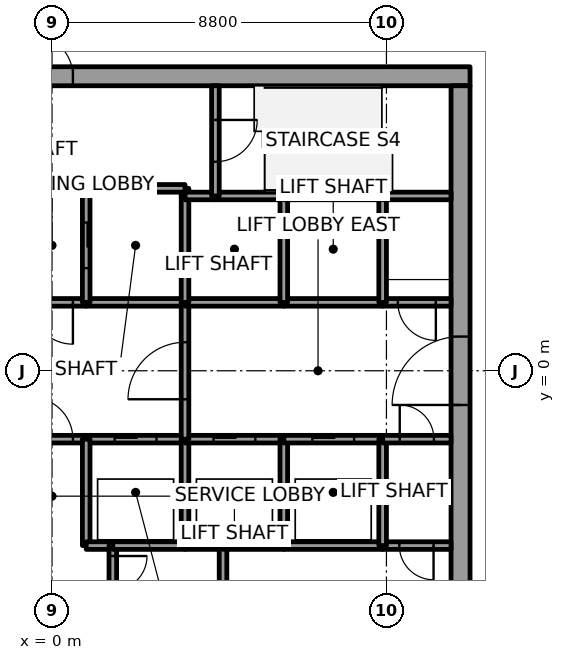
"""IFC4 building model, lengths in metres.
Left out: names, types, materials, properties, quantities, classifications, styles, units other than length and angle.
Written with IfcOpenShell. Run it as: python <this file> out.ifc"""

import sys

from ifc_helpers import new_model, si_unit, direction, frame, frame_2d, origin, place, context, subcontext, project, spatial, rectangle, extrude, element, fill, save


model = new_model("IFC4")
c1 = context("Model", 3, precision=1e-05, world=origin(), true_north=direction((0.0, 1.0)))
c2 = subcontext(c1, "Body", "Model", "MODEL_VIEW")
j1 = project(units=[si_unit("LENGTHUNIT", "METRE"), si_unit("PLANEANGLEUNIT", "RADIAN")], contexts=[c1])
p1 = place(None, origin())
s1 = spatial("IfcSite", under=j1, at=p1, CompositionType="ELEMENT")
p2 = place(p1, origin())
s2 = spatial("IfcBuilding", under=s1, at=p2, CompositionType="ELEMENT")
p3 = place(p2, frame((0.0, 0.0, 173.8)))
s3 = spatial("IfcBuildingStorey", under=s2, at=p3, CompositionType="ELEMENT", Elevation=173.8)
p4 = place(p3, frame((-11.0, 7.75, 0.0), z_axis=(0.0, 0.0, 1.0), x_axis=(1.0, 0.0, 0.0)))
e1 = element("IfcWall", 1, at=p4, inside=s3, PredefinedType="SHEAR", context=c2, shape_type="SweptSolid", body=[
    extrude(rectangle(XDim=22.0, YDim=0.5, at=frame_2d((11.0, 0.0))), origin(), (0.0, 0.0, 1.0), 4.0),
])
p5 = place(p4, frame((10.45, 0.0, 0.0)))
e2 = element("IfcOpeningElement", 2, at=p5, cuts=e1, PredefinedType="OPENING", context=c2, shape_type="SweptSolid", body=[
    extrude(rectangle(XDim=1.1, YDim=2.1, at=frame_2d((0.55, 1.05))), frame((0.0, 0.25, 0.0), z_axis=(0.0, -1.0, 0.0), x_axis=(1.0, 0.0, 0.0)), (0.0, 0.0, 1.0), 0.5),
])
p6 = place(p3, frame((10.75, -7.5, 0.0), z_axis=(0.0, 0.0, 1.0), x_axis=(0.0, 1.0, 0.0)))
e3 = element("IfcWall", 3, at=p6, inside=s3, PredefinedType="SHEAR", context=c2, shape_type="SweptSolid", body=[
    extrude(rectangle(XDim=15.0, YDim=0.5, at=frame_2d((7.5, 0.0))), origin(), (0.0, 0.0, 1.0), 4.0),
])
p7 = place(p6, frame((6.6, 0.0, 0.0)))
e4 = element("IfcOpeningElement", 4, at=p7, cuts=e3, PredefinedType="OPENING", context=c2, shape_type="SweptSolid", body=[
    extrude(rectangle(XDim=1.8, YDim=2.1, at=frame_2d((0.9, 1.05))), frame((0.0, 0.25, 0.0), z_axis=(0.0, -1.0, 0.0), x_axis=(1.0, 0.0, 0.0)), (0.0, 0.0, 1.0), 0.5),
])
p8 = place(p3, frame((-0.9, -1.8, 0.0), z_axis=(0.0, 0.0, 1.0), x_axis=(1.0, 0.0, 0.0)))
e5 = element("IfcWall", 5, at=p8, inside=s3, PredefinedType="SOLIDWALL", context=c2, shape_type="SweptSolid", body=[
    extrude(rectangle(XDim=1.8, YDim=0.2, at=frame_2d((0.9, 0.0))), origin(), (0.0, 0.0, 1.0), 3.85),
])
p9 = place(p8, frame((0.35, 0.0, 0.0)))
e6 = element("IfcOpeningElement", 6, at=p9, cuts=e5, PredefinedType="OPENING", context=c2, shape_type="SweptSolid", body=[
    extrude(rectangle(XDim=1.1, YDim=2.1, at=frame_2d((0.55, 1.05))), frame((0.0, 0.1, 0.0), z_axis=(0.0, -1.0, 0.0), x_axis=(1.0, 0.0, 0.0)), (0.0, 0.0, 1.0), 0.2),
])
p10 = place(p3, frame((0.9, 1.8, 0.0), z_axis=(0.0, 0.0, 1.0), x_axis=(-1.0, 0.0, 0.0)))
e7 = element("IfcWall", 7, at=p10, inside=s3, PredefinedType="SOLIDWALL", context=c2, shape_type="SweptSolid", body=[
    extrude(rectangle(XDim=1.8, YDim=0.2, at=frame_2d((0.9, 0.0))), origin(), (0.0, 0.0, 1.0), 3.85),
])
p11 = place(p10, frame((0.35, 0.0, 0.0)))
e8 = element("IfcOpeningElement", 8, at=p11, cuts=e7, PredefinedType="OPENING", context=c2, shape_type="SweptSolid", body=[
    extrude(rectangle(XDim=1.1, YDim=2.1, at=frame_2d((0.55, 1.05))), frame((0.0, 0.1, 0.0), z_axis=(0.0, -1.0, 0.0), x_axis=(1.0, 0.0, 0.0)), (0.0, 0.0, 1.0), 0.2),
])
p12 = place(p3, frame((0.9, -1.8, 0.0), z_axis=(0.0, 0.0, 1.0), x_axis=(1.0, 0.0, 0.0)))
e9 = element("IfcWall", 9, at=p12, inside=s3, PredefinedType="SOLIDWALL", context=c2, shape_type="SweptSolid", body=[
    extrude(rectangle(XDim=2.6, YDim=0.2, at=frame_2d((1.3, 0.0))), origin(), (0.0, 0.0, 1.0), 3.85),
])
p13 = place(p12, frame((0.75, 0.0, 0.0)))
e10 = element("IfcOpeningElement", 10, at=p13, cuts=e9, PredefinedType="OPENING", context=c2, shape_type="SweptSolid", body=[
    extrude(rectangle(XDim=1.1, YDim=2.1, at=frame_2d((0.55, 1.05))), frame((0.0, 0.1, 0.0), z_axis=(0.0, -1.0, 0.0), x_axis=(1.0, 0.0, 0.0)), (0.0, 0.0, 1.0), 0.2),
])
p14 = place(p3, frame((0.9, -1.8, 0.0), z_axis=(0.0, 0.0, 1.0), x_axis=(0.0, -1.0, 0.0)))
e11 = element("IfcWall", 11, at=p14, inside=s3, PredefinedType="SOLIDWALL", context=c2, shape_type="SweptSolid", body=[
    extrude(rectangle(XDim=2.8, YDim=0.2, at=frame_2d((1.4, 0.0))), origin(), (0.0, 0.0, 1.0), 3.85),
])
p15 = place(p3, frame((0.9, -4.6, 0.0), z_axis=(0.0, 0.0, 1.0), x_axis=(1.0, 0.0, 0.0)))
e12 = element("IfcWall", 12, at=p15, inside=s3, PredefinedType="SOLIDWALL", context=c2, shape_type="SweptSolid", body=[
    extrude(rectangle(XDim=0.7, YDim=0.2, at=frame_2d((0.35, 0.0))), origin(), (0.0, 0.0, 1.0), 3.85),
])
p16 = place(p3, frame((3.5, 1.8, 0.0), z_axis=(0.0, 0.0, 1.0), x_axis=(-1.0, 0.0, 0.0)))
e13 = element("IfcWall", 13, at=p16, inside=s3, PredefinedType="SOLIDWALL", context=c2, shape_type="SweptSolid", body=[
    extrude(rectangle(XDim=2.6, YDim=0.2, at=frame_2d((1.3, 0.0))), origin(), (0.0, 0.0, 1.0), 3.85),
])
p17 = place(p3, frame((3.5, 4.6, 0.0), z_axis=(0.0, 0.0, 1.0), x_axis=(0.0, 1.0, 0.0)))
e14 = element("IfcWall", 14, at=p17, inside=s3, PredefinedType="SOLIDWALL", context=c2, shape_type="SweptSolid", body=[
    extrude(rectangle(XDim=0.2, YDim=0.2, at=frame_2d((0.1, 0.0))), origin(), (0.0, 0.0, 1.0), 3.85),
])
p18 = place(p3, frame((3.5, 4.8, 0.0), z_axis=(0.0, 0.0, 1.0), x_axis=(-1.0, 0.0, 0.0)))
e15 = element("IfcWall", 15, at=p18, inside=s3, PredefinedType="SOLIDWALL", context=c2, shape_type="SweptSolid", body=[
    extrude(rectangle(XDim=2.6, YDim=0.2, at=frame_2d((1.3, 0.0))), origin(), (0.0, 0.0, 1.0), 3.85),
])
p19 = place(p3, frame((0.9, 4.8, 0.0), z_axis=(0.0, 0.0, 1.0), x_axis=(0.0, -1.0, 0.0)))
e16 = element("IfcWall", 16, at=p19, inside=s3, PredefinedType="SOLIDWALL", context=c2, shape_type="SweptSolid", body=[
    extrude(rectangle(XDim=3.0, YDim=0.2, at=frame_2d((1.5, 0.0))), origin(), (0.0, 0.0, 1.0), 3.85),
])
p20 = place(p19, frame((0.9, 0.0, 0.0)))
e17 = element("IfcOpeningElement", 17, at=p20, cuts=e16, PredefinedType="OPENING", context=c2, shape_type="SweptSolid", body=[
    extrude(rectangle(XDim=1.2, YDim=2.1, at=frame_2d((0.6, 1.05))), frame((0.0, 0.1, 0.0), z_axis=(0.0, -1.0, 0.0), x_axis=(1.0, 0.0, 0.0)), (0.0, 0.0, 1.0), 0.2),
])
p21 = place(p3, frame((1.6, -4.6, 0.0), z_axis=(0.0, 0.0, 1.0), x_axis=(0.0, -1.0, 0.0)))
e18 = element("IfcWall", 18, at=p21, inside=s3, PredefinedType="SOLIDWALL", context=c2, shape_type="SweptSolid", body=[
    extrude(rectangle(XDim=1.45, YDim=0.2, at=frame_2d((0.725, 0.0))), origin(), (0.0, 0.0, 1.0), 3.85),
])
p22 = place(p21, frame((0.275, 0.0, 0.0)))
e19 = element("IfcOpeningElement", 19, at=p22, cuts=e18, PredefinedType="OPENING", context=c2, shape_type="SweptSolid", body=[
    extrude(rectangle(XDim=0.9, YDim=2.1, at=frame_2d((0.45, 1.05))), frame((0.0, 0.1, 0.0), z_axis=(0.0, -1.0, 0.0), x_axis=(1.0, 0.0, 0.0)), (0.0, 0.0, 1.0), 0.2),
])
p23 = place(p3, frame((3.5, -4.6, 0.0), z_axis=(0.0, 0.0, 1.0), x_axis=(-1.0, 0.0, 0.0)))
e20 = element("IfcWall", 20, at=p23, inside=s3, PredefinedType="SOLIDWALL", context=c2, shape_type="SweptSolid", body=[
    extrude(rectangle(XDim=1.9, YDim=0.2, at=frame_2d((0.95, 0.0))), origin(), (0.0, 0.0, 1.0), 3.85),
])
p24 = place(p3, frame((4.5, -4.6, 0.0), z_axis=(0.0, 0.0, 1.0), x_axis=(-1.0, 0.0, 0.0)))
e21 = element("IfcWall", 21, at=p24, inside=s3, PredefinedType="SOLIDWALL", context=c2, shape_type="SweptSolid", body=[
    extrude(rectangle(XDim=1.0, YDim=0.2, at=frame_2d((0.5, 0.0))), origin(), (0.0, 0.0, 1.0), 3.85),
])
p25 = place(p3, frame((3.5, -4.6, 0.0), z_axis=(0.0, 0.0, 1.0), x_axis=(0.0, 1.0, 0.0)))
e22 = element("IfcWall", 22, at=p25, inside=s3, PredefinedType="SOLIDWALL", context=c2, shape_type="SweptSolid", body=[
    extrude(rectangle(XDim=2.8, YDim=0.2, at=frame_2d((1.4, 0.0))), origin(), (0.0, 0.0, 1.0), 3.85),
])
p26 = place(p3, frame((3.5, -1.8, 0.0), z_axis=(0.0, 0.0, 1.0), x_axis=(1.0, 0.0, 0.0)))
e23 = element("IfcWall", 23, at=p26, inside=s3, PredefinedType="SOLIDWALL", context=c2, shape_type="SweptSolid", body=[
    extrude(rectangle(XDim=2.6, YDim=0.2, at=frame_2d((1.3, 0.0))), origin(), (0.0, 0.0, 1.0), 3.85),
])
p27 = place(p26, frame((0.75, 0.0, 0.0)))
e24 = element("IfcOpeningElement", 24, at=p27, cuts=e23, PredefinedType="OPENING", context=c2, shape_type="SweptSolid", body=[
    extrude(rectangle(XDim=1.1, YDim=2.1, at=frame_2d((0.55, 1.05))), frame((0.0, 0.1, 0.0), z_axis=(0.0, -1.0, 0.0), x_axis=(1.0, 0.0, 0.0)), (0.0, 0.0, 1.0), 0.2),
])
p28 = place(p3, frame((3.5, -1.8, 0.0), z_axis=(0.0, 0.0, 1.0), x_axis=(0.0, 1.0, 0.0)))
e25 = element("IfcWall", 25, at=p28, inside=s3, PredefinedType="SOLIDWALL", context=c2, shape_type="SweptSolid", body=[
    extrude(rectangle(XDim=3.6, YDim=0.2, at=frame_2d((1.8, 0.0))), origin(), (0.0, 0.0, 1.0), 3.85),
])
p29 = place(p28, frame((1.05, 0.0, 0.0)))
e26 = element("IfcOpeningElement", 26, at=p29, cuts=e25, PredefinedType="OPENING", context=c2, shape_type="SweptSolid", body=[
    extrude(rectangle(XDim=1.5, YDim=2.1, at=frame_2d((0.75, 1.05))), frame((0.0, 0.1, 0.0), z_axis=(0.0, -1.0, 0.0), x_axis=(1.0, 0.0, 0.0)), (0.0, 0.0, 1.0), 0.2),
])
p30 = place(p3, frame((6.1, 1.8, 0.0), z_axis=(0.0, 0.0, 1.0), x_axis=(-1.0, 0.0, 0.0)))
e27 = element("IfcWall", 27, at=p30, inside=s3, PredefinedType="SOLIDWALL", context=c2, shape_type="SweptSolid", body=[
    extrude(rectangle(XDim=2.6, YDim=0.2, at=frame_2d((1.3, 0.0))), origin(), (0.0, 0.0, 1.0), 3.85),
])
p31 = place(p3, frame((3.5, 1.8, 0.0), z_axis=(0.0, 0.0, 1.0), x_axis=(0.0, 1.0, 0.0)))
e28 = element("IfcWall", 28, at=p31, inside=s3, PredefinedType="SOLIDWALL", context=c2, shape_type="SweptSolid", body=[
    extrude(rectangle(XDim=2.8, YDim=0.2, at=frame_2d((1.4, 0.0))), origin(), (0.0, 0.0, 1.0), 3.85),
])
p32 = place(p3, frame((4.3, 4.6, 0.0), z_axis=(0.0, 0.0, 1.0), x_axis=(-1.0, 0.0, 0.0)))
e29 = element("IfcWall", 29, at=p32, inside=s3, PredefinedType="SOLIDWALL", context=c2, shape_type="SweptSolid", body=[
    extrude(rectangle(XDim=0.8, YDim=0.2, at=frame_2d((0.4, 0.0))), origin(), (0.0, 0.0, 1.0), 3.85),
])
p33 = place(p3, frame((6.1, 4.6, 0.0), z_axis=(0.0, 0.0, 1.0), x_axis=(-1.0, 0.0, 0.0)))
e30 = element("IfcWall", 30, at=p33, inside=s3, PredefinedType="SOLIDWALL", context=c2, shape_type="SweptSolid", body=[
    extrude(rectangle(XDim=1.8, YDim=0.2, at=frame_2d((0.9, 0.0))), origin(), (0.0, 0.0, 1.0), 3.85),
])
p34 = place(p3, frame((4.3, 7.5, 0.0), z_axis=(0.0, 0.0, 1.0), x_axis=(0.0, -1.0, 0.0)))
e31 = element("IfcWall", 31, at=p34, inside=s3, PredefinedType="SOLIDWALL", context=c2, shape_type="SweptSolid", body=[
    extrude(rectangle(XDim=2.9, YDim=0.2, at=frame_2d((1.45, 0.0))), origin(), (0.0, 0.0, 1.0), 3.85),
])
p35 = place(p34, frame((0.9, 0.0, 0.0)))
e32 = element("IfcOpeningElement", 32, at=p35, cuts=e31, PredefinedType="OPENING", context=c2, shape_type="SweptSolid", body=[
    extrude(rectangle(XDim=1.1, YDim=2.1, at=frame_2d((0.55, 1.05))), frame((0.0, 0.1, 0.0), z_axis=(0.0, -1.0, 0.0), x_axis=(1.0, 0.0, 0.0)), (0.0, 0.0, 1.0), 0.2),
])
p36 = place(p3, frame((4.5, -4.6, 0.0), z_axis=(0.0, 0.0, 1.0), x_axis=(0.0, -1.0, 0.0)))
e33 = element("IfcWall", 33, at=p36, inside=s3, PredefinedType="SOLIDWALL", context=c2, shape_type="SweptSolid", body=[
    extrude(rectangle(XDim=1.45, YDim=0.2, at=frame_2d((0.725, 0.0))), origin(), (0.0, 0.0, 1.0), 3.85),
])
p37 = place(p3, frame((6.1, -4.6, 0.0), z_axis=(0.0, 0.0, 1.0), x_axis=(-1.0, 0.0, 0.0)))
e34 = element("IfcWall", 34, at=p37, inside=s3, PredefinedType="SOLIDWALL", context=c2, shape_type="SweptSolid", body=[
    extrude(rectangle(XDim=1.6, YDim=0.2, at=frame_2d((0.8, 0.0))), origin(), (0.0, 0.0, 1.0), 3.85),
])
p38 = place(p3, frame((8.7, -4.6, 0.0), z_axis=(0.0, 0.0, 1.0), x_axis=(-1.0, 0.0, 0.0)))
e35 = element("IfcWall", 35, at=p38, inside=s3, PredefinedType="SOLIDWALL", context=c2, shape_type="SweptSolid", body=[
    extrude(rectangle(XDim=2.6, YDim=0.2, at=frame_2d((1.3, 0.0))), origin(), (0.0, 0.0, 1.0), 3.85),
])
p39 = place(p3, frame((6.1, -4.6, 0.0), z_axis=(0.0, 0.0, 1.0), x_axis=(0.0, 1.0, 0.0)))
e36 = element("IfcWall", 36, at=p39, inside=s3, PredefinedType="SOLIDWALL", context=c2, shape_type="SweptSolid", body=[
    extrude(rectangle(XDim=2.8, YDim=0.2, at=frame_2d((1.4, 0.0))), origin(), (0.0, 0.0, 1.0), 3.85),
])
p40 = place(p3, frame((6.1, -1.8, 0.0), z_axis=(0.0, 0.0, 1.0), x_axis=(1.0, 0.0, 0.0)))
e37 = element("IfcWall", 37, at=p40, inside=s3, PredefinedType="SOLIDWALL", context=c2, shape_type="SweptSolid", body=[
    extrude(rectangle(XDim=2.6, YDim=0.2, at=frame_2d((1.3, 0.0))), origin(), (0.0, 0.0, 1.0), 3.85),
])
p41 = place(p40, frame((0.75, 0.0, 0.0)))
e38 = element("IfcOpeningElement", 38, at=p41, cuts=e37, PredefinedType="OPENING", context=c2, shape_type="SweptSolid", body=[
    extrude(rectangle(XDim=1.1, YDim=2.1, at=frame_2d((0.55, 1.05))), frame((0.0, 0.1, 0.0), z_axis=(0.0, -1.0, 0.0), x_axis=(1.0, 0.0, 0.0)), (0.0, 0.0, 1.0), 0.2),
])
p42 = place(p3, frame((8.7, 1.8, 0.0), z_axis=(0.0, 0.0, 1.0), x_axis=(-1.0, 0.0, 0.0)))
e39 = element("IfcWall", 39, at=p42, inside=s3, PredefinedType="SOLIDWALL", context=c2, shape_type="SweptSolid", body=[
    extrude(rectangle(XDim=2.6, YDim=0.2, at=frame_2d((1.3, 0.0))), origin(), (0.0, 0.0, 1.0), 3.85),
])
p43 = place(p3, frame((6.1, 1.8, 0.0), z_axis=(0.0, 0.0, 1.0), x_axis=(0.0, 1.0, 0.0)))
e40 = element("IfcWall", 40, at=p43, inside=s3, PredefinedType="SOLIDWALL", context=c2, shape_type="SweptSolid", body=[
    extrude(rectangle(XDim=2.8, YDim=0.2, at=frame_2d((1.4, 0.0))), origin(), (0.0, 0.0, 1.0), 3.85),
])
p44 = place(p3, frame((8.7, 4.6, 0.0), z_axis=(0.0, 0.0, 1.0), x_axis=(-1.0, 0.0, 0.0)))
e41 = element("IfcWall", 41, at=p44, inside=s3, PredefinedType="SOLIDWALL", context=c2, shape_type="SweptSolid", body=[
    extrude(rectangle(XDim=2.6, YDim=0.2, at=frame_2d((1.3, 0.0))), origin(), (0.0, 0.0, 1.0), 3.85),
])
p45 = place(p3, frame((10.5, -4.6, 0.0), z_axis=(0.0, 0.0, 1.0), x_axis=(-1.0, 0.0, 0.0)))
e42 = element("IfcWall", 42, at=p45, inside=s3, PredefinedType="SOLIDWALL", context=c2, shape_type="SweptSolid", body=[
    extrude(rectangle(XDim=1.8, YDim=0.2, at=frame_2d((0.9, 0.0))), origin(), (0.0, 0.0, 1.0), 3.85),
])
p46 = place(p45, frame((0.46, 0.0, 0.0)))
e43 = element("IfcOpeningElement", 43, at=p46, cuts=e42, PredefinedType="OPENING", context=c2, shape_type="SweptSolid", body=[
    extrude(rectangle(XDim=0.9, YDim=2.1, at=frame_2d((0.45, 1.05))), frame((0.0, 0.1, 0.0), z_axis=(0.0, -1.0, 0.0), x_axis=(1.0, 0.0, 0.0)), (0.0, 0.0, 1.0), 0.2),
])
p47 = place(p3, frame((8.7, -1.8, 0.0), z_axis=(0.0, 0.0, 1.0), x_axis=(0.0, -1.0, 0.0)))
e44 = element("IfcWall", 44, at=p47, inside=s3, PredefinedType="SOLIDWALL", context=c2, shape_type="SweptSolid", body=[
    extrude(rectangle(XDim=2.8, YDim=0.2, at=frame_2d((1.4, 0.0))), origin(), (0.0, 0.0, 1.0), 3.85),
])
p48 = place(p3, frame((8.7, -1.8, 0.0), z_axis=(0.0, 0.0, 1.0), x_axis=(1.0, 0.0, 0.0)))
e45 = element("IfcWall", 45, at=p48, inside=s3, PredefinedType="SOLIDWALL", context=c2, shape_type="SweptSolid", body=[
    extrude(rectangle(XDim=1.8, YDim=0.2, at=frame_2d((0.9, 0.0))), origin(), (0.0, 0.0, 1.0), 3.85),
])
p49 = place(p48, frame((0.45, 0.0, 0.0)))
e46 = element("IfcOpeningElement", 46, at=p49, cuts=e45, PredefinedType="OPENING", context=c2, shape_type="SweptSolid", body=[
    extrude(rectangle(XDim=0.9, YDim=2.1, at=frame_2d((0.45, 1.05))), frame((0.0, 0.1, 0.0), z_axis=(0.0, -1.0, 0.0), x_axis=(1.0, 0.0, 0.0)), (0.0, 0.0, 1.0), 0.2),
])
p50 = place(p3, frame((10.5, 1.8, 0.0), z_axis=(0.0, 0.0, 1.0), x_axis=(-1.0, 0.0, 0.0)))
e47 = element("IfcWall", 47, at=p50, inside=s3, PredefinedType="SOLIDWALL", context=c2, shape_type="SweptSolid", body=[
    extrude(rectangle(XDim=1.8, YDim=0.2, at=frame_2d((0.9, 0.0))), origin(), (0.0, 0.0, 1.0), 3.85),
])
p51 = place(p50, frame((0.4, 0.0, 0.0)))
e48 = element("IfcOpeningElement", 48, at=p51, cuts=e47, PredefinedType="OPENING", context=c2, shape_type="SweptSolid", body=[
    extrude(rectangle(XDim=1.0, YDim=2.1, at=frame_2d((0.5, 1.05))), frame((0.0, 0.1, 0.0), z_axis=(0.0, -1.0, 0.0), x_axis=(1.0, 0.0, 0.0)), (0.0, 0.0, 1.0), 0.2),
])
p52 = place(p3, frame((8.7, 4.6, 0.0), z_axis=(0.0, 0.0, 1.0), x_axis=(0.0, -1.0, 0.0)))
e49 = element("IfcWall", 49, at=p52, inside=s3, PredefinedType="SOLIDWALL", context=c2, shape_type="SweptSolid", body=[
    extrude(rectangle(XDim=2.8, YDim=0.2, at=frame_2d((1.4, 0.0))), origin(), (0.0, 0.0, 1.0), 3.85),
])
p53 = place(p3, frame((10.5, 4.6, 0.0), z_axis=(0.0, 0.0, 1.0), x_axis=(-1.0, 0.0, 0.0)))
e50 = element("IfcWall", 50, at=p53, inside=s3, PredefinedType="SOLIDWALL", context=c2, shape_type="SweptSolid", body=[
    extrude(rectangle(XDim=1.8, YDim=0.2, at=frame_2d((0.9, 0.0))), origin(), (0.0, 0.0, 1.0), 3.85),
])
p54 = place(p13, origin())
e51 = element("IfcDoor", 51, at=p54, inside=s3, OperationType="SLIDING_TO_LEFT", PredefinedType="DOOR", context=c2, shape_type="SweptSolid", body=[
    extrude(rectangle(XDim=1.1, YDim=2.1, at=frame_2d((0.55, 1.05))), frame((0.0, 0.025, 0.0), z_axis=(0.0, -1.0, 0.0), x_axis=(1.0, 0.0, 0.0)), (0.0, 0.0, 1.0), 0.05),
])
fill(e10, e51)
p55 = place(p27, origin())
e52 = element("IfcDoor", 52, at=p55, inside=s3, OperationType="SLIDING_TO_LEFT", PredefinedType="DOOR", context=c2, shape_type="SweptSolid", body=[
    extrude(rectangle(XDim=1.1, YDim=2.1, at=frame_2d((0.55, 1.05))), frame((0.0, 0.025, 0.0), z_axis=(0.0, -1.0, 0.0), x_axis=(1.0, 0.0, 0.0)), (0.0, 0.0, 1.0), 0.05),
])
fill(e24, e52)
p56 = place(p41, origin())
e53 = element("IfcDoor", 53, at=p56, inside=s3, OperationType="SLIDING_TO_LEFT", PredefinedType="DOOR", context=c2, shape_type="SweptSolid", body=[
    extrude(rectangle(XDim=1.1, YDim=2.1, at=frame_2d((0.55, 1.05))), frame((0.0, 0.025, 0.0), z_axis=(0.0, -1.0, 0.0), x_axis=(1.0, 0.0, 0.0)), (0.0, 0.0, 1.0), 0.05),
])
fill(e38, e53)
p57 = place(p20, origin())
e54 = element("IfcDoor", 54, at=p57, inside=s3, OperationType="SLIDING_TO_LEFT", PredefinedType="DOOR", context=c2, shape_type="SweptSolid", body=[
    extrude(rectangle(XDim=1.2, YDim=2.1, at=frame_2d((0.6, 1.05))), frame((0.0, 0.025, 0.0), z_axis=(0.0, -1.0, 0.0), x_axis=(1.0, 0.0, 0.0)), (0.0, 0.0, 1.0), 0.05),
])
fill(e17, e54)
p58 = place(p29, origin())
e55 = element("IfcDoor", 55, at=p58, inside=s3, OperationType="DOUBLE_DOOR_SINGLE_SWING", PredefinedType="DOOR", context=c2, shape_type="SweptSolid", body=[
    extrude(rectangle(XDim=1.5, YDim=2.1, at=frame_2d((0.75, 1.05))), frame((0.0, 0.025, 0.0), z_axis=(0.0, -1.0, 0.0), x_axis=(1.0, 0.0, 0.0)), (0.0, 0.0, 1.0), 0.05),
])
fill(e26, e55)
p59 = place(p11, origin())
e56 = element("IfcDoor", 56, at=p59, inside=s3, OperationType="SINGLE_SWING_RIGHT", PredefinedType="DOOR", context=c2, shape_type="SweptSolid", body=[
    extrude(rectangle(XDim=1.1, YDim=2.1, at=frame_2d((0.55, 1.05))), frame((0.0, 0.025, 0.0), z_axis=(0.0, -1.0, 0.0), x_axis=(1.0, 0.0, 0.0)), (0.0, 0.0, 1.0), 0.05),
])
fill(e8, e56)
p60 = place(p9, origin())
e57 = element("IfcDoor", 57, at=p60, inside=s3, OperationType="SINGLE_SWING_RIGHT", PredefinedType="DOOR", context=c2, shape_type="SweptSolid", body=[
    extrude(rectangle(XDim=1.1, YDim=2.1, at=frame_2d((0.55, 1.05))), frame((0.0, 0.025, 0.0), z_axis=(0.0, -1.0, 0.0), x_axis=(1.0, 0.0, 0.0)), (0.0, 0.0, 1.0), 0.05),
])
fill(e6, e57)
p61 = place(p51, origin())
e58 = element("IfcDoor", 58, at=p61, inside=s3, OperationType="SINGLE_SWING_LEFT", PredefinedType="DOOR", context=c2, shape_type="SweptSolid", body=[
    extrude(rectangle(XDim=1.0, YDim=2.1, at=frame_2d((0.5, 1.05))), frame((0.0, 0.025, 0.0), z_axis=(0.0, -1.0, 0.0), x_axis=(1.0, 0.0, 0.0)), (0.0, 0.0, 1.0), 0.05),
])
fill(e48, e58)
p62 = place(p35, origin())
e59 = element("IfcDoor", 59, at=p62, inside=s3, OperationType="SINGLE_SWING_RIGHT", PredefinedType="DOOR", context=c2, shape_type="SweptSolid", body=[
    extrude(rectangle(XDim=1.1, YDim=2.1, at=frame_2d((0.55, 1.05))), frame((0.0, 0.025, 0.0), z_axis=(0.0, -1.0, 0.0), x_axis=(1.0, 0.0, 0.0)), (0.0, 0.0, 1.0), 0.05),
])
fill(e32, e59)
p63 = place(p46, origin())
e60 = element("IfcDoor", 60, at=p63, inside=s3, OperationType="SINGLE_SWING_RIGHT", PredefinedType="DOOR", context=c2, shape_type="SweptSolid", body=[
    extrude(rectangle(XDim=0.9, YDim=2.1, at=frame_2d((0.45, 1.05))), frame((0.0, 0.025, 0.0), z_axis=(0.0, -1.0, 0.0), x_axis=(1.0, 0.0, 0.0)), (0.0, 0.0, 1.0), 0.05),
])
fill(e43, e60)
p64 = place(p49, origin())
e61 = element("IfcDoor", 61, at=p64, inside=s3, OperationType="SINGLE_SWING_RIGHT", PredefinedType="DOOR", context=c2, shape_type="SweptSolid", body=[
    extrude(rectangle(XDim=0.9, YDim=2.1, at=frame_2d((0.45, 1.05))), frame((0.0, 0.025, 0.0), z_axis=(0.0, -1.0, 0.0), x_axis=(1.0, 0.0, 0.0)), (0.0, 0.0, 1.0), 0.05),
])
fill(e46, e61)
p65 = place(p22, origin())
e62 = element("IfcDoor", 62, at=p65, inside=s3, OperationType="SINGLE_SWING_LEFT", PredefinedType="DOOR", context=c2, shape_type="SweptSolid", body=[
    extrude(rectangle(XDim=0.9, YDim=2.1, at=frame_2d((0.45, 1.05))), frame((0.0, 0.025, 0.0), z_axis=(0.0, -1.0, 0.0), x_axis=(1.0, 0.0, 0.0)), (0.0, 0.0, 1.0), 0.05),
])
fill(e19, e62)
p66 = place(p7, origin())
e63 = element("IfcDoor", 63, at=p66, inside=s3, OperationType="DOUBLE_DOOR_SINGLE_SWING", PredefinedType="DOOR", context=c2, shape_type="SweptSolid", body=[
    extrude(rectangle(XDim=1.8, YDim=2.1, at=frame_2d((0.9, 1.05))), frame((0.0, 0.025, 0.0), z_axis=(0.0, -1.0, 0.0), x_axis=(1.0, 0.0, 0.0)), (0.0, 0.0, 1.0), 0.05),
])
fill(e4, e63)
p67 = place(p5, origin())
e64 = element("IfcDoor", 64, at=p67, inside=s3, OperationType="SINGLE_SWING_RIGHT", PredefinedType="DOOR", context=c2, shape_type="SweptSolid", body=[
    extrude(rectangle(XDim=1.1, YDim=2.1, at=frame_2d((0.55, 1.05))), frame((0.0, 0.025, 0.0), z_axis=(0.0, -1.0, 0.0), x_axis=(1.0, 0.0, 0.0)), (0.0, 0.0, 1.0), 0.05),
])
fill(e2, e64)
save(model, sys.argv[1])
